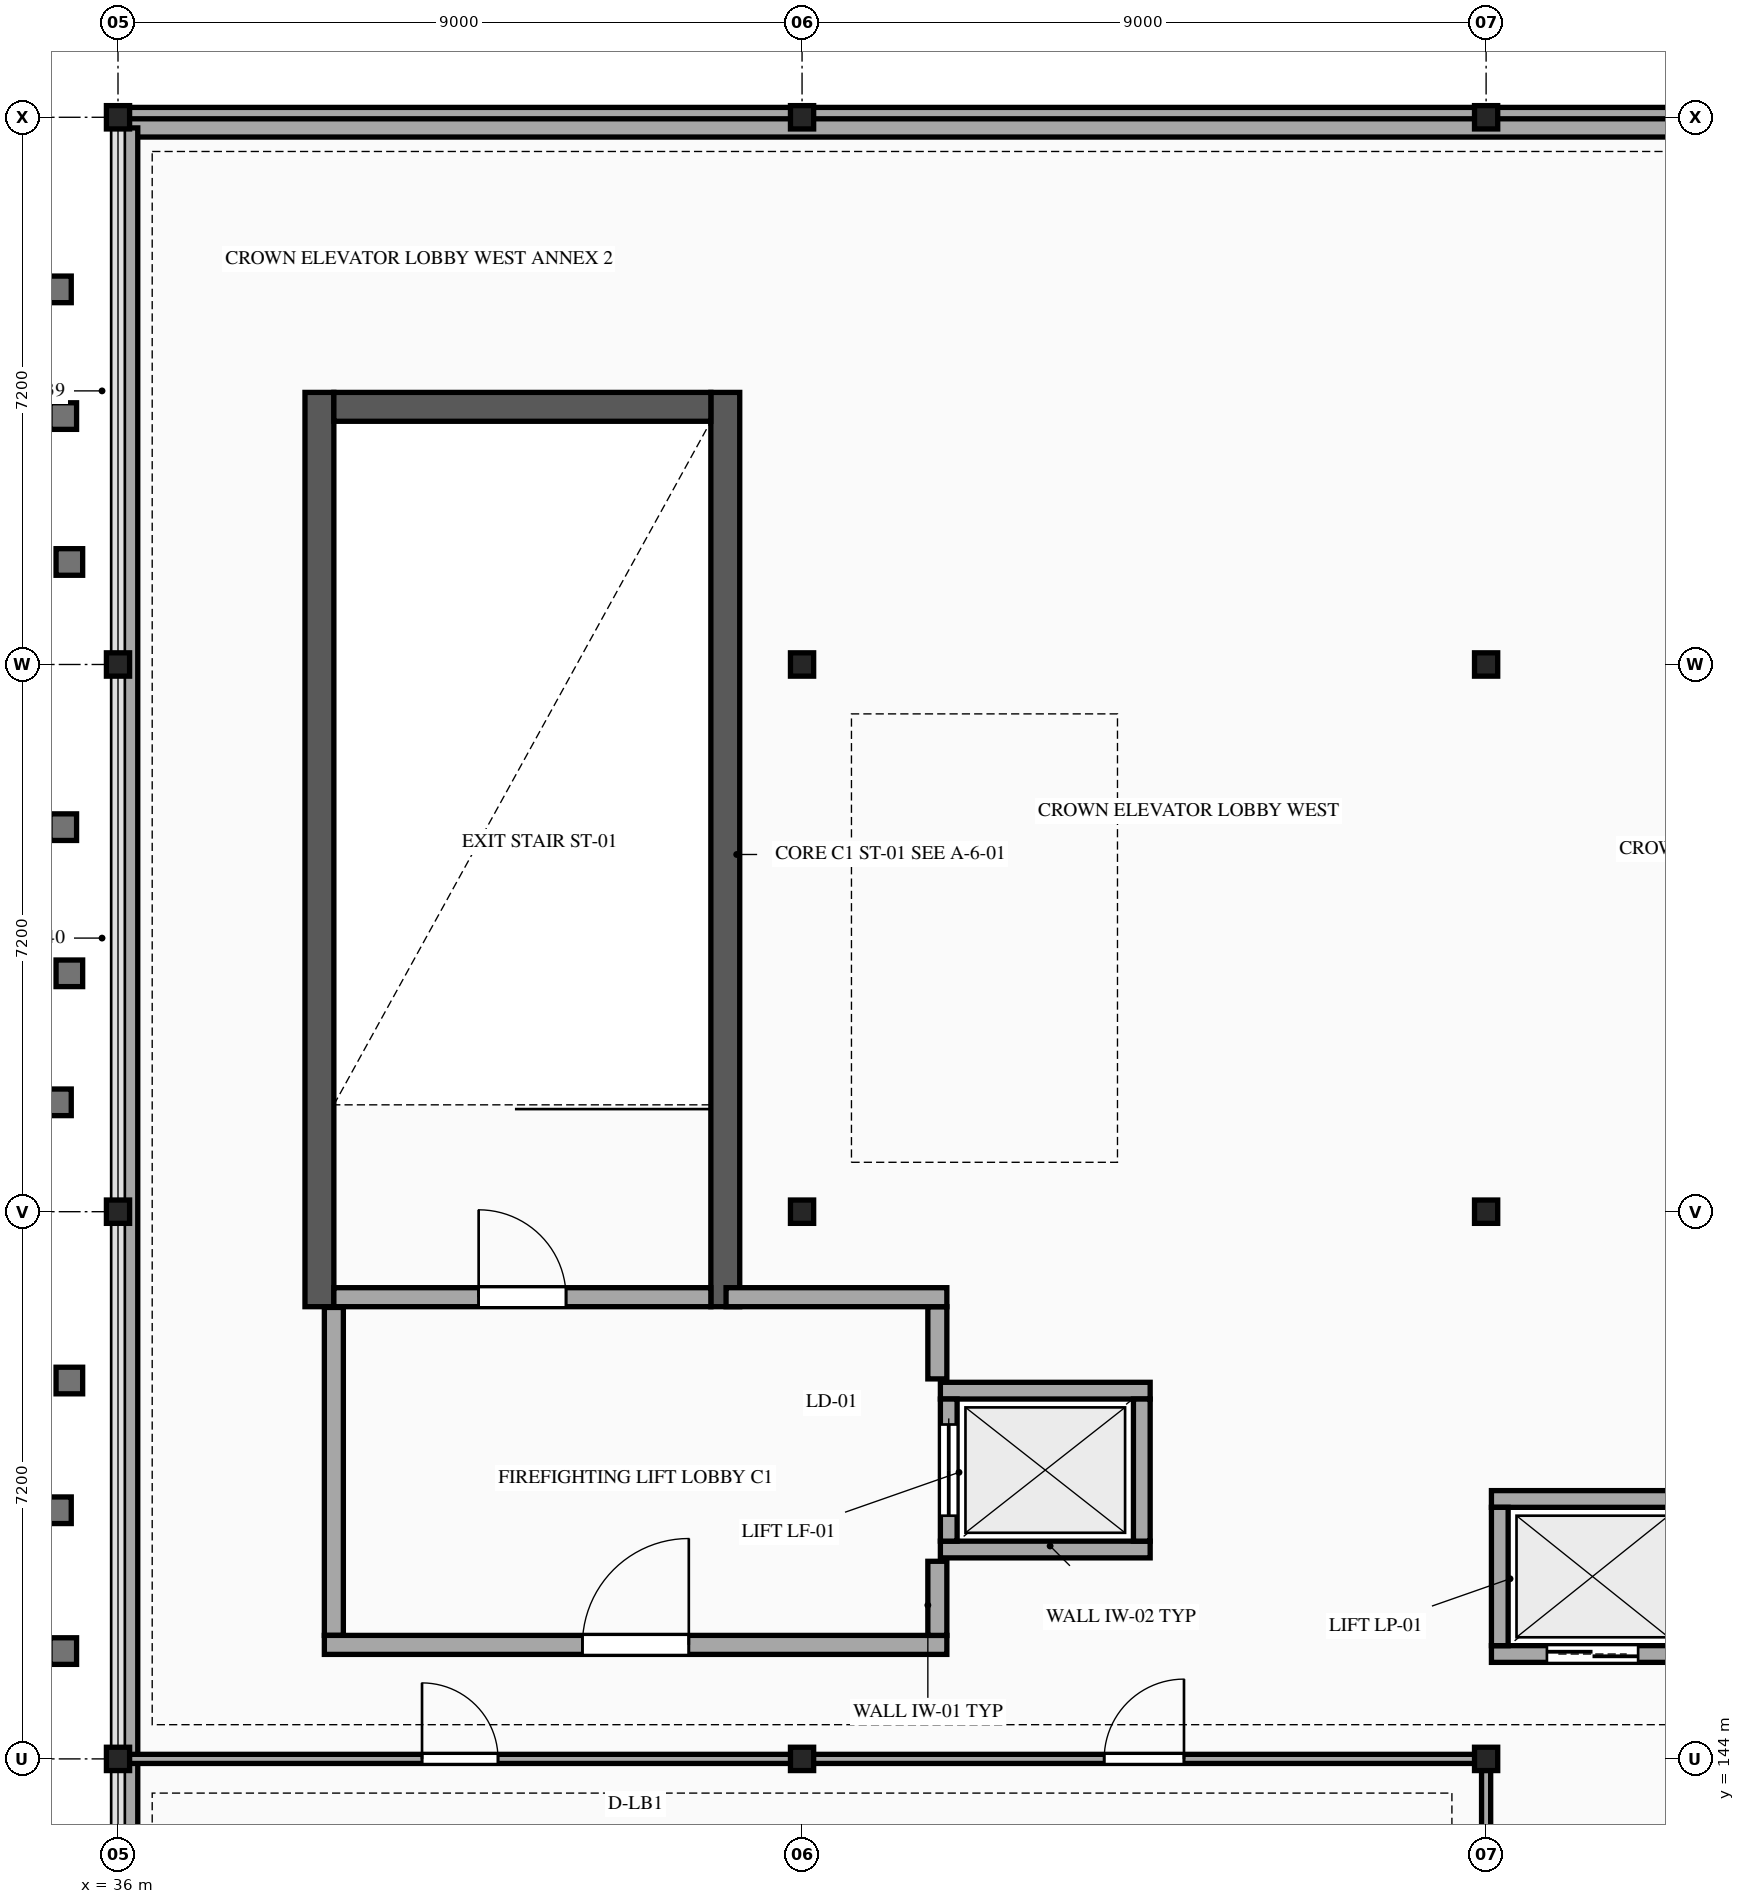
"""IFC4 building model, lengths in metres.
Left out: names, types, materials, properties, quantities, classifications, styles, units other than length and angle.
Written with IfcOpenShell. Run it as: python <this file> out.ifc"""

import sys

from ifc_helpers import new_model, si_unit, direction, frame, frame_2d, origin, origin_2d, place, context, subcontext, project, spatial, rectangle, i_section, extrude, element, fill, save


model = new_model("IFC4")
c1 = context("Model", 3, precision=1e-05, world=origin(), true_north=direction((0.0, 1.0)))
c2 = subcontext(c1, "Body", "Model", "MODEL_VIEW")
j1 = project(units=[si_unit("LENGTHUNIT", "METRE"), si_unit("PLANEANGLEUNIT", "RADIAN")], contexts=[c1])
p1 = place(None, origin())
s1 = spatial("IfcSite", under=j1, at=p1, CompositionType="ELEMENT")
p2 = place(p1, origin())
s2 = spatial("IfcBuilding", under=s1, at=p2, CompositionType="ELEMENT")
p3 = place(p2, frame((0.0, 0.0, 24.3)))
s3 = spatial("IfcBuildingStorey", under=s2, at=p3, CompositionType="ELEMENT", Elevation=24.3)
for number, where, z_axis, x_axis in (
    (1, (36.0, 144.0, 0.0), (0.0, 0.0, 1.0), (1.0, 0.0, 0.0)),
    (2, (36.0, 151.2, 0.0), (0.0, 0.0, 1.0), (1.0, 0.0, 0.0)),
    (3, (36.0, 158.4, 0.0), (0.0, 0.0, 1.0), (1.0, 0.0, 0.0)),
    (4, (36.0, 165.6, 0.0), (0.0, 0.0, 1.0), (1.0, 0.0, 0.0)),
    (5, (45.0, 144.0, 0.0), (0.0, 0.0, 1.0), (1.0, 0.0, 0.0)),
    (6, (45.0, 151.2, 0.0), (0.0, 0.0, 1.0), (1.0, 0.0, 0.0)),
    (7, (45.0, 158.4, 0.0), (0.0, 0.0, 1.0), (1.0, 0.0, 0.0)),
    (8, (45.0, 165.6, 0.0), (0.0, 0.0, 1.0), (1.0, 0.0, 0.0)),
    (9, (54.0, 144.0, 0.0), (0.0, 0.0, 1.0), (1.0, 0.0, 0.0)),
    (10, (54.0, 151.2, 0.0), (0.0, 0.0, 1.0), (1.0, 0.0, 0.0)),
    (11, (54.0, 158.4, 0.0), (0.0, 0.0, 1.0), (1.0, 0.0, 0.0)),
    (12, (54.0, 165.6, 0.0), (0.0, 0.0, 1.0), (1.0, 0.0, 0.0)),
):
    element("IfcColumn", number, at=place(p3, frame(where, z_axis=z_axis, x_axis=x_axis)), inside=s3, PredefinedType="COLUMN", context=c2, shape_type="SweptSolid", body=[
        extrude(i_section(OverallWidth=0.305, OverallDepth=0.307, WebThickness=0.01, FlangeThickness=0.015, at=origin_2d()), origin(), (0.0, 0.0, 1.0), 4.5),
    ])
for number, where, z_axis, x_axis in (
    (13, (38.65, 149.95, 0.0), (0.0, 0.0, 1.0), (0.0, 1.0, 0.0)),
    (14, (43.99, 161.98, 0.0), (0.0, 0.0, 1.0), (0.0, -1.0, 0.0)),
):
    element("IfcWall", number, at=place(p3, frame(where, z_axis=z_axis, x_axis=x_axis)), inside=s3, PredefinedType="SHEAR", context=c2, shape_type="SweptSolid", body=[
        extrude(rectangle(XDim=12.03, YDim=0.38, at=frame_2d((6.015, 0.0))), origin(), (0.0, 0.0, 1.0), 4.26),
    ])
p4 = place(p3, frame((38.84, 161.79, 0.0), z_axis=(0.0, 0.0, 1.0), x_axis=(1.0, 0.0, 0.0)))
e15 = element("IfcWall", 15, at=p4, inside=s3, PredefinedType="SHEAR", context=c2, shape_type="SweptSolid", body=[
    extrude(rectangle(XDim=4.96, YDim=0.38, at=frame_2d((2.48, 0.0))), origin(), (0.0, 0.0, 1.0), 4.26),
])
for number, where, z_axis, x_axis in (
    (16, (36.005, 165.6, 0.0), (0.0, 0.0, 1.0), (1.0, 0.0, 0.0)),
    (17, (45.005, 165.6, 0.0), (0.0, 0.0, 1.0), (1.0, 0.0, 0.0)),
    (18, (54.005, 165.6, 0.0), (0.0, 0.0, 1.0), (1.0, 0.0, 0.0)),
):
    element("IfcWall", number, at=place(p3, frame(where, z_axis=z_axis, x_axis=x_axis)), inside=s3, PredefinedType="STANDARD", context=c2, shape_type="SweptSolid", body=[
        extrude(rectangle(XDim=8.99, YDim=0.26, at=frame_2d((4.495, 0.0))), origin(), (0.0, 0.0, 1.0), 3.648),
    ])
p5 = place(p3, frame((36.14, 165.46, 4.5), z_axis=(0.0, 0.0, 1.0), x_axis=(1.0, 0.0, 0.0)))
e19 = element("IfcWall", 19, at=p5, inside=s3, PredefinedType="PARAPET", context=c2, shape_type="SweptSolid", body=[
    extrude(rectangle(XDim=62.72, YDim=0.24, at=frame_2d((31.36, 0.0))), origin(), (0.0, 0.0, 1.0), 0.65),
])
p6 = place(p3, frame((36.14, 108.14, 4.5), z_axis=(0.0, 0.0, 1.0), x_axis=(0.0, 1.0, 0.0)))
e20 = element("IfcWall", 20, at=p6, inside=s3, PredefinedType="PARAPET", context=c2, shape_type="SweptSolid", body=[
    extrude(rectangle(XDim=57.32, YDim=0.24, at=frame_2d((28.66, 0.0))), origin(), (0.0, 0.0, 1.0), 0.65),
])
p7 = place(p3, frame((38.84, 150.075, 0.0), z_axis=(0.0, 0.0, 1.0), x_axis=(1.0, 0.0, 0.0)))
e21 = element("IfcWall", 21, at=p7, inside=s3, PredefinedType="STANDARD", context=c2, shape_type="SweptSolid", body=[
    extrude(rectangle(XDim=4.96, YDim=0.25, at=frame_2d((2.48, 0.0))), origin(), (0.0, 0.0, 1.0), 4.26),
])
p8 = place(p7, frame((1.905, 0.0, 0.0)))
e22 = element("IfcOpeningElement", 22, at=p8, cuts=e21, PredefinedType="OPENING", context=c2, shape_type="SweptSolid", body=[
    extrude(rectangle(XDim=1.15, YDim=2.2, at=frame_2d((0.575, 1.1))), frame((0.0, 0.135, 0.0), z_axis=(0.0, -1.0, 0.0), x_axis=(1.0, 0.0, 0.0)), (0.0, 0.0, 1.0), 0.27),
])
for number, where, z_axis, x_axis in (
    (23, (46.82, 146.755, 0.0), (0.0, 0.0, 1.0), (1.0, 0.0, 0.0)),
    (24, (49.58, 148.845, 0.0), (0.0, 0.0, 1.0), (-1.0, 0.0, 0.0)),
):
    element("IfcWall", number, at=place(p3, frame(where, z_axis=z_axis, x_axis=x_axis)), inside=s3, PredefinedType="STANDARD", context=c2, shape_type="SweptSolid", body=[
        extrude(rectangle(XDim=2.76, YDim=0.22, at=frame_2d((1.38, 0.0))), origin(), (0.0, 0.0, 1.0), 4.26),
    ])
p9 = place(p3, frame((46.93, 148.735, 0.0), z_axis=(0.0, 0.0, 1.0), x_axis=(0.0, -1.0, 0.0)))
e25 = element("IfcWall", 25, at=p9, inside=s3, PredefinedType="STANDARD", context=c2, shape_type="SweptSolid", body=[
    extrude(rectangle(XDim=1.87, YDim=0.22, at=frame_2d((0.935, 0.0))), origin(), (0.0, 0.0, 1.0), 4.26),
])
p10 = place(p9, frame((0.335, 0.0, 0.0)))
e26 = element("IfcOpeningElement", 26, at=p10, cuts=e25, PredefinedType="OPENING", context=c2, shape_type="SweptSolid", body=[
    extrude(rectangle(XDim=1.2, YDim=2.2, at=frame_2d((0.6, 1.1))), frame((0.0, 0.12, 0.0), z_axis=(0.0, -1.0, 0.0), x_axis=(1.0, 0.0, 0.0)), (0.0, 0.0, 1.0), 0.24),
])
p11 = place(p3, frame((49.47, 146.865, 0.0), z_axis=(0.0, 0.0, 1.0), x_axis=(0.0, 1.0, 0.0)))
e27 = element("IfcWall", 27, at=p11, inside=s3, PredefinedType="STANDARD", context=c2, shape_type="SweptSolid", body=[
    extrude(rectangle(XDim=1.87, YDim=0.22, at=frame_2d((0.935, 0.0))), origin(), (0.0, 0.0, 1.0), 4.26),
])
p12 = place(p3, frame((54.07, 145.38, 0.0), z_axis=(0.0, 0.0, 1.0), x_axis=(1.0, 0.0, 0.0)))
e28 = element("IfcWall", 28, at=p12, inside=s3, PredefinedType="STANDARD", context=c2, shape_type="SweptSolid", body=[
    extrude(rectangle(XDim=2.66, YDim=0.22, at=frame_2d((1.33, 0.0))), origin(), (0.0, 0.0, 1.0), 3.648),
])
p13 = place(p12, frame((0.73, 0.0, 0.0)))
e29 = element("IfcOpeningElement", 29, at=p13, cuts=e28, PredefinedType="OPENING", context=c2, shape_type="SweptSolid", body=[
    extrude(rectangle(XDim=1.2, YDim=2.2, at=frame_2d((0.6, 1.1))), frame((0.0, 0.12, 0.0), z_axis=(0.0, -1.0, 0.0), x_axis=(1.0, 0.0, 0.0)), (0.0, 0.0, 1.0), 0.24),
])
p14 = place(p3, frame((56.73, 147.42, 0.0), z_axis=(0.0, 0.0, 1.0), x_axis=(-1.0, 0.0, 0.0)))
e30 = element("IfcWall", 30, at=p14, inside=s3, PredefinedType="STANDARD", context=c2, shape_type="SweptSolid", body=[
    extrude(rectangle(XDim=2.66, YDim=0.22, at=frame_2d((1.33, 0.0))), origin(), (0.0, 0.0, 1.0), 3.648),
])
p15 = place(p3, frame((54.18, 147.31, 0.0), z_axis=(0.0, 0.0, 1.0), x_axis=(0.0, -1.0, 0.0)))
e31 = element("IfcWall", 31, at=p15, inside=s3, PredefinedType="STANDARD", context=c2, shape_type="SweptSolid", body=[
    extrude(rectangle(XDim=1.82, YDim=0.22, at=frame_2d((0.91, 0.0))), origin(), (0.0, 0.0, 1.0), 3.648),
])
p16 = place(p3, frame((38.84, 149.94, 0.0), z_axis=(0.0, 0.0, 1.0), x_axis=(0.0, -1.0, 0.0)))
e32 = element("IfcWall", 32, at=p16, inside=s3, PredefinedType="STANDARD", context=c2, shape_type="SweptSolid", body=[
    extrude(rectangle(XDim=4.315, YDim=0.25, at=frame_2d((2.157, 0.0))), origin(), (0.0, 0.0, 1.0), 3.648),
])
p17 = place(p3, frame((38.715, 145.5, 0.0), z_axis=(0.0, 0.0, 1.0), x_axis=(1.0, 0.0, 0.0)))
e33 = element("IfcWall", 33, at=p17, inside=s3, PredefinedType="STANDARD", context=c2, shape_type="SweptSolid", body=[
    extrude(rectangle(XDim=8.19, YDim=0.25, at=frame_2d((4.095, 0.0))), origin(), (0.0, 0.0, 1.0), 3.648),
])
p18 = place(p17, frame((3.395, 0.0, 0.0)))
e34 = element("IfcOpeningElement", 34, at=p18, cuts=e33, PredefinedType="OPENING", context=c2, shape_type="SweptSolid", body=[
    extrude(rectangle(XDim=1.4, YDim=2.2, at=frame_2d((0.7, 1.1))), frame((0.0, 0.135, 0.0), z_axis=(0.0, -1.0, 0.0), x_axis=(1.0, 0.0, 0.0)), (0.0, 0.0, 1.0), 0.27),
])
p19 = place(p3, frame((46.78, 145.625, 0.0), z_axis=(0.0, 0.0, 1.0), x_axis=(0.0, 1.0, 0.0)))
e35 = element("IfcWall", 35, at=p19, inside=s3, PredefinedType="STANDARD", context=c2, shape_type="SweptSolid", body=[
    extrude(rectangle(XDim=0.975, YDim=0.25, at=frame_2d((0.488, 0.0))), origin(), (0.0, 0.0, 1.0), 3.648),
])
p20 = place(p3, frame((46.78, 149.0, 0.0), z_axis=(0.0, 0.0, 1.0), x_axis=(0.0, 1.0, 0.0)))
e36 = element("IfcWall", 36, at=p20, inside=s3, PredefinedType="STANDARD", context=c2, shape_type="SweptSolid", body=[
    extrude(rectangle(XDim=0.95, YDim=0.25, at=frame_2d((0.475, 0.0))), origin(), (0.0, 0.0, 1.0), 3.648),
])
p21 = place(p3, frame((44.0, 150.075, 0.0), z_axis=(0.0, 0.0, 1.0), x_axis=(1.0, 0.0, 0.0)))
e37 = element("IfcWall", 37, at=p21, inside=s3, PredefinedType="STANDARD", context=c2, shape_type="SweptSolid", body=[
    extrude(rectangle(XDim=2.905, YDim=0.25, at=frame_2d((1.453, 0.0))), origin(), (0.0, 0.0, 1.0), 3.648),
])
p22 = place(p3, frame((36.005, 144.0, 0.0), z_axis=(0.0, 0.0, 1.0), x_axis=(1.0, 0.0, 0.0)))
e38 = element("IfcWall", 38, at=p22, inside=s3, PredefinedType="PARTITIONING", context=c2, shape_type="SweptSolid", body=[
    extrude(rectangle(XDim=8.99, YDim=0.12, at=frame_2d((4.495, 0.0))), origin(), (0.0, 0.0, 1.0), 3.648),
])
p23 = place(p22, frame((3.995, 0.0, 0.0)))
e39 = element("IfcOpeningElement", 39, at=p23, cuts=e38, PredefinedType="OPENING", context=c2, shape_type="SweptSolid", body=[
    extrude(rectangle(XDim=1.0, YDim=2.15, at=frame_2d((0.5, 1.075))), frame((0.0, 0.07, 0.0), z_axis=(0.0, -1.0, 0.0), x_axis=(1.0, 0.0, 0.0)), (0.0, 0.0, 1.0), 0.14),
])
p24 = place(p3, frame((45.005, 144.0, 0.0), z_axis=(0.0, 0.0, 1.0), x_axis=(1.0, 0.0, 0.0)))
e40 = element("IfcWall", 40, at=p24, inside=s3, PredefinedType="PARTITIONING", context=c2, shape_type="SweptSolid", body=[
    extrude(rectangle(XDim=8.99, YDim=0.12, at=frame_2d((4.495, 0.0))), origin(), (0.0, 0.0, 1.0), 3.648),
])
p25 = place(p24, frame((3.97, 0.0, 0.0)))
e41 = element("IfcOpeningElement", 41, at=p25, cuts=e40, PredefinedType="OPENING", context=c2, shape_type="SweptSolid", body=[
    extrude(rectangle(XDim=1.05, YDim=2.15, at=frame_2d((0.525, 1.075))), frame((0.0, 0.07, 0.0), z_axis=(0.0, -1.0, 0.0), x_axis=(1.0, 0.0, 0.0)), (0.0, 0.0, 1.0), 0.14),
])
p26 = place(p3, frame((54.0, 136.951, 0.0), z_axis=(0.0, 0.0, 1.0), x_axis=(0.0, 1.0, 0.0)))
e42 = element("IfcWall", 42, at=p26, inside=s3, PredefinedType="PARTITIONING", context=c2, shape_type="SweptSolid", body=[
    extrude(rectangle(XDim=6.897, YDim=0.12, at=frame_2d((3.448, 0.0))), origin(), (0.0, 0.0, 1.0), 3.648),
])
p27 = place(p8, origin())
e43 = element("IfcDoor", 43, at=p27, inside=s3, OperationType="SINGLE_SWING_LEFT", PredefinedType="DOOR", context=c2, shape_type="SweptSolid", body=[
    extrude(rectangle(XDim=1.15, YDim=2.2, at=frame_2d((0.575, 1.1))), frame((0.0, 0.025, 0.0), z_axis=(0.0, -1.0, 0.0), x_axis=(1.0, 0.0, 0.0)), (0.0, 0.0, 1.0), 0.05),
])
fill(e22, e43)
p28 = place(p10, origin())
e44 = element("IfcDoor", 44, at=p28, inside=s3, OperationType="DOUBLE_DOOR_SLIDING", PredefinedType="DOOR", context=c2, shape_type="SweptSolid", body=[
    extrude(rectangle(XDim=1.2, YDim=2.2, at=frame_2d((0.6, 1.1))), frame((0.0, 0.025, 0.0), z_axis=(0.0, -1.0, 0.0), x_axis=(1.0, 0.0, 0.0)), (0.0, 0.0, 1.0), 0.05),
])
fill(e26, e44)
p29 = place(p13, origin())
e45 = element("IfcDoor", 45, at=p29, inside=s3, OperationType="DOUBLE_DOOR_SLIDING", PredefinedType="DOOR", context=c2, shape_type="SweptSolid", body=[
    extrude(rectangle(XDim=1.2, YDim=2.2, at=frame_2d((0.6, 1.1))), frame((0.0, 0.025, 0.0), z_axis=(0.0, -1.0, 0.0), x_axis=(1.0, 0.0, 0.0)), (0.0, 0.0, 1.0), 0.05),
])
fill(e29, e45)
p30 = place(p18, origin())
e46 = element("IfcDoor", 46, at=p30, inside=s3, OperationType="SINGLE_SWING_RIGHT", PredefinedType="DOOR", context=c2, shape_type="SweptSolid", body=[
    extrude(rectangle(XDim=1.4, YDim=2.2, at=frame_2d((0.7, 1.1))), frame((0.0, 0.025, 0.0), z_axis=(0.0, -1.0, 0.0), x_axis=(1.0, 0.0, 0.0)), (0.0, 0.0, 1.0), 0.05),
])
fill(e34, e46)
p31 = place(p23, origin())
e47 = element("IfcDoor", 47, at=p31, inside=s3, OperationType="SINGLE_SWING_LEFT", PredefinedType="DOOR", context=c2, shape_type="SweptSolid", body=[
    extrude(rectangle(XDim=1.0, YDim=2.15, at=frame_2d((0.5, 1.075))), frame((0.0, 0.025, 0.0), z_axis=(0.0, -1.0, 0.0), x_axis=(1.0, 0.0, 0.0)), (0.0, 0.0, 1.0), 0.05),
])
fill(e39, e47)
p32 = place(p25, origin())
e48 = element("IfcDoor", 48, at=p32, inside=s3, OperationType="SINGLE_SWING_RIGHT", PredefinedType="DOOR", context=c2, shape_type="SweptSolid", body=[
    extrude(rectangle(XDim=1.05, YDim=2.15, at=frame_2d((0.525, 1.075))), frame((0.0, 0.025, 0.0), z_axis=(0.0, -1.0, 0.0), x_axis=(1.0, 0.0, 0.0)), (0.0, 0.0, 1.0), 0.05),
])
fill(e41, e48)
save(model, sys.argv[1])
